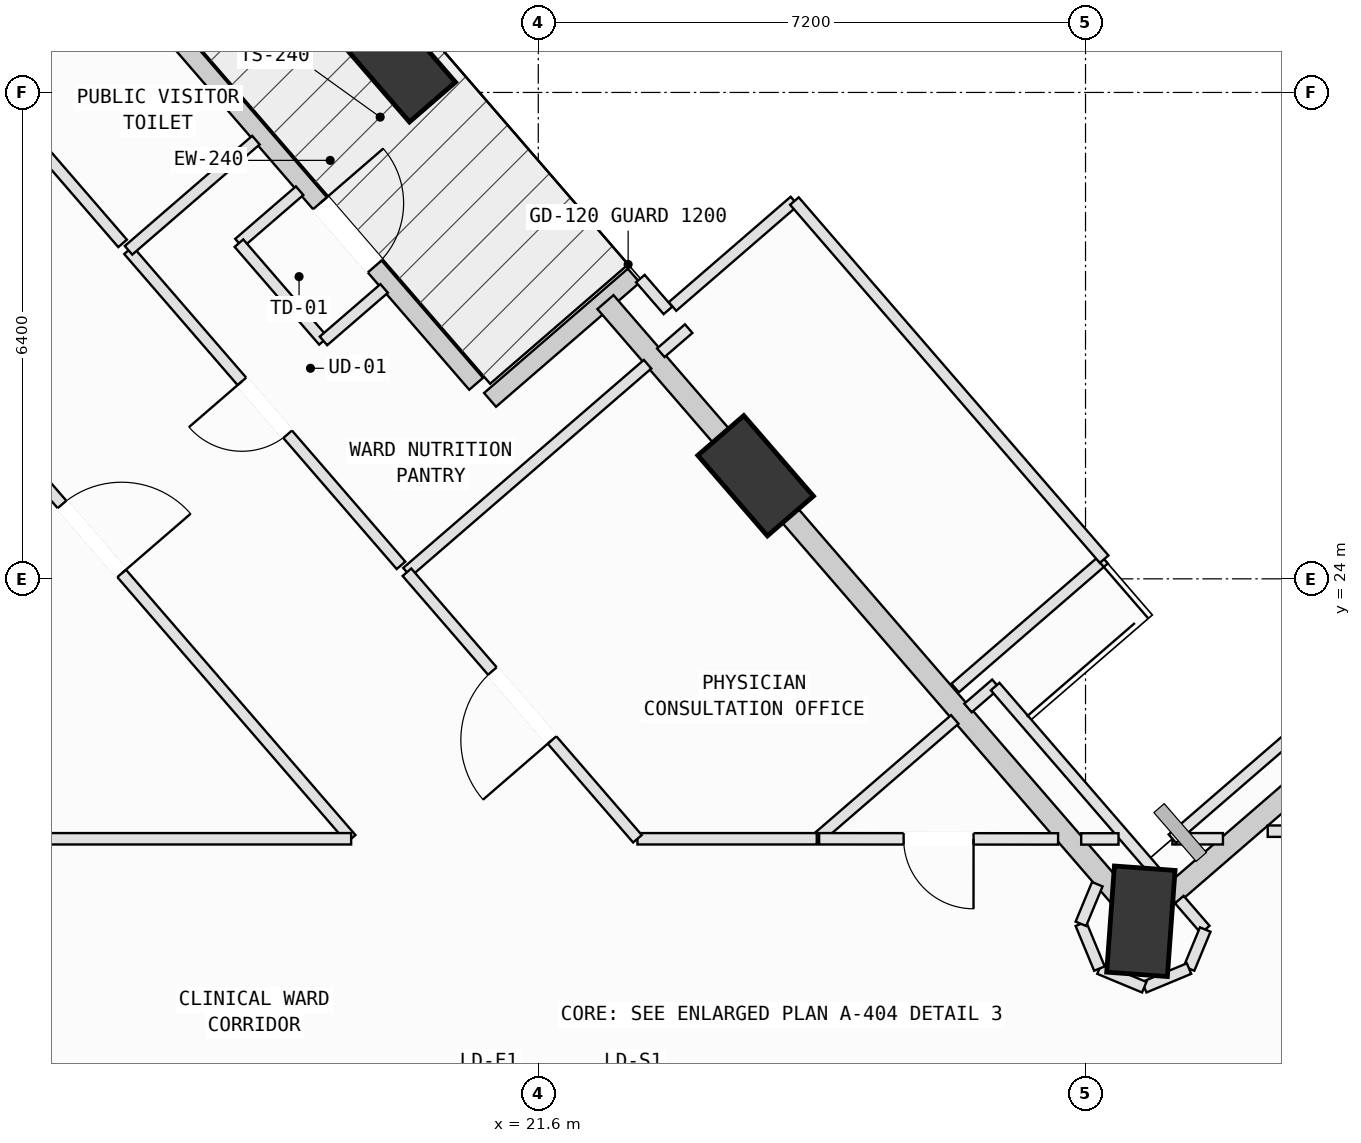
"""IFC4 building model, lengths in metres.
Left out: names, types, materials, properties, quantities, classifications, styles, units other than length and angle.
Written with IfcOpenShell. Run it as: python <this file> out.ifc"""

import sys

from ifc_helpers import new_model, si_unit, direction, frame, frame_2d, origin, origin_2d, place, context, subcontext, project, spatial, rectangle, extrude, element, fill, save


model = new_model("IFC4")
c1 = context("Model", 3, precision=1e-05, world=origin(), true_north=direction((0.0, 1.0)))
c2 = subcontext(c1, "Body", "Model", "MODEL_VIEW")
j1 = project(units=[si_unit("LENGTHUNIT", "METRE"), si_unit("PLANEANGLEUNIT", "RADIAN")], contexts=[c1])
p1 = place(None, origin())
s1 = spatial("IfcSite", under=j1, at=p1, CompositionType="ELEMENT")
p2 = place(p1, origin())
s2 = spatial("IfcBuilding", under=s1, at=p2, CompositionType="ELEMENT")
p3 = place(p2, frame((0.0, 0.0, 197.8)))
s3 = spatial("IfcBuildingStorey", under=s2, at=p3, CompositionType="ELEMENT", Elevation=197.8)
p4 = place(p3, frame((29.529, 19.495, 0.002), z_axis=(0.022106472195, -0.016732523153, 0.999615589392), x_axis=(-0.751277418033, 0.659407001277, 0.027652266093)))
e1 = element("IfcColumn", 1, at=p4, inside=s3, PredefinedType="COLUMN", context=c2, shape_type="SweptSolid", body=[
    extrude(rectangle(XDim=1.4, YDim=0.8, at=origin_2d()), origin(), (0.0, 0.0, 1.0), 3.998),
])
p5 = place(p3, frame((24.459, 25.357, 0.002), z_axis=(-0.001953505753, -0.03791022102, 0.999279239731), x_axis=(-0.614315591928, 0.788537788742, 0.028714268915)))
e2 = element("IfcColumn", 2, at=p5, inside=s3, PredefinedType="COLUMN", context=c2, shape_type="SweptSolid", body=[
    extrude(rectangle(XDim=1.4, YDim=0.8, at=origin_2d()), origin(), (0.0, 0.0, 1.0), 3.999),
])
p6 = place(p3, frame((19.75, 30.803, 0.002), z_axis=(-0.024327793483, -0.057496514422, 0.998049251938), x_axis=(-0.30819596819, 0.95015002601, 0.047224710319)))
e3 = element("IfcColumn", 3, at=p6, inside=s3, PredefinedType="COLUMN", context=c2, shape_type="SweptSolid", body=[
    extrude(rectangle(XDim=1.4, YDim=0.8, at=origin_2d()), origin(), (0.0, 0.0, 1.0), 4.004),
])
p7 = place(p3, frame((16.23, 31.831, 0.0), z_axis=(0.0, 0.0, 1.0), x_axis=(0.654092813451, -0.756414298775, 0.0)))
e4 = element("IfcWall", 4, at=p7, inside=s3, PredefinedType="SOLIDWALL", context=c2, shape_type="SweptSolid", body=[
    extrude(rectangle(XDim=6.96, YDim=0.24, at=frame_2d((3.48, 0.0))), origin(), (0.0, 0.0, 1.0), 3.265),
])
p8 = place(p7, frame((3.82, 0.0, 0.0)))
e5 = element("IfcOpeningElement", 5, at=p8, cuts=e4, PredefinedType="OPENING", context=c2, shape_type="SweptSolid", body=[
    extrude(rectangle(XDim=1.1, YDim=2.15, at=frame_2d((0.55, 1.075))), frame((0.0, 0.13, 0.0), z_axis=(0.0, -1.0, 0.0), x_axis=(1.0, 0.0, 0.0)), (0.0, 0.0, 1.0), 0.26),
])
p9 = place(p3, frame((20.966, 26.355, 0.0), z_axis=(0.0, 0.0, 1.0), x_axis=(0.756423238551, 0.65408247506, 0.0)))
e6 = element("IfcWall", 6, at=p9, inside=s3, PredefinedType="SOLIDWALL", context=c2, shape_type="SweptSolid", body=[
    extrude(rectangle(XDim=2.5, YDim=0.24, at=frame_2d((1.25, 0.0))), origin(), (0.0, 0.0, 1.0), 3.265),
])
p10 = place(p3, frame((29.91, 19.825, 0.0), z_axis=(0.0, 0.0, 1.0), x_axis=(0.756415755537, 0.6540911288, 0.0)))
e7 = element("IfcWall", 7, at=p10, inside=s3, PredefinedType="SOLIDWALL", context=c2, shape_type="SweptSolid", body=[
    extrude(rectangle(XDim=5.96, YDim=0.28, at=frame_2d((2.98, 0.0))), origin(), (0.0, 0.0, 1.0), 3.065),
])
p11 = place(p3, frame((29.24, 19.829, 0.0), z_axis=(0.0, 0.0, 1.0), x_axis=(-0.654095531107, 0.756411948733, 0.0)))
e8 = element("IfcWall", 8, at=p11, inside=s3, PredefinedType="SOLIDWALL", context=c2, shape_type="SweptSolid", body=[
    extrude(rectangle(XDim=6.76, YDim=0.28, at=frame_2d((3.38, 0.0))), origin(), (0.0, 0.0, 1.0), 3.265),
])
p12 = place(p3, frame((24.172, 25.689, 0.0), z_axis=(0.0, 0.0, 1.0), x_axis=(-0.654087588851, 0.756418816603, 0.0)))
e9 = element("IfcWall", 9, at=p12, inside=s3, PredefinedType="SOLIDWALL", context=c2, shape_type="SweptSolid", body=[
    extrude(rectangle(XDim=2.582, YDim=0.28, at=frame_2d((1.291, 0.0))), origin(), (0.0, 0.0, 1.0), 3.245),
])
p13 = place(p3, frame((12.314, 28.471, 0.0), z_axis=(0.0, 0.0, 1.0), x_axis=(0.654121175756, -0.756389772159, 0.0)))
e10 = element("IfcWall", 10, at=p13, inside=s3, PredefinedType="PARTITIONING", context=c2, shape_type="SweptSolid", body=[
    extrude(rectangle(XDim=10.432, YDim=0.15, at=frame_2d((5.216, 0.0))), origin(), (0.0, 0.0, 1.0), 3.78),
])
p14 = place(p13, frame((4.616, 0.0, 0.0)))
e11 = element("IfcOpeningElement", 11, at=p14, cuts=e10, PredefinedType="OPENING", context=c2, shape_type="SweptSolid", body=[
    extrude(rectangle(XDim=1.2, YDim=2.15, at=frame_2d((0.6, 1.075))), frame((0.0, 0.085, 0.0), z_axis=(0.0, -1.0, 0.0), x_axis=(1.0, 0.0, 0.0)), (0.0, 0.0, 1.0), 0.17),
])
p15 = place(p3, frame((19.138, 20.58, 0.0), z_axis=(0.0, 0.0, 1.0), x_axis=(-1.0, 0.0, 0.0)))
e12 = element("IfcWall", 12, at=p15, inside=s3, PredefinedType="PARTITIONING", context=c2, shape_type="SweptSolid", body=[
    extrude(rectangle(XDim=4.141, YDim=0.15, at=frame_2d((2.07, 0.0))), origin(), (0.0, 0.0, 1.0), 3.78),
])
p16 = place(p3, frame((30.608, 20.58, 0.0), z_axis=(0.0, 0.0, 1.0), x_axis=(-1.0, 0.0, 0.0)))
e13 = element("IfcWall", 13, at=p16, inside=s3, PredefinedType="PARTITIONING", context=c2, shape_type="SweptSolid", body=[
    extrude(rectangle(XDim=0.665, YDim=0.15, at=frame_2d((0.333, 0.0))), origin(), (0.0, 0.0, 1.0), 3.78),
])
p17 = place(p3, frame((29.943, 20.58, 0.0), z_axis=(0.0, 0.0, 1.0), x_axis=(0.756413617827, 0.654093600921, 0.0)))
e14 = element("IfcWall", 14, at=p17, inside=s3, PredefinedType="PARTITIONING", context=c2, shape_type="SweptSolid", body=[
    extrude(rectangle(XDim=12.167, YDim=0.15, at=frame_2d((6.083, 0.0))), origin(), (0.0, 0.0, 1.0), 3.78),
])
p18 = place(p3, frame((40.134, 20.68, 0.0), z_axis=(0.0, 0.0, 1.0), x_axis=(-1.0, 0.0, 0.0)))
e15 = element("IfcWall", 15, at=p18, inside=s3, PredefinedType="PARTITIONING", context=c2, shape_type="SweptSolid", body=[
    extrude(rectangle(XDim=8.937, YDim=0.15, at=frame_2d((4.469, 0.0))), origin(), (0.0, 0.0, 1.0), 3.78),
])
p19 = place(p18, frame((3.868, 0.0, 0.0)))
e16 = element("IfcOpeningElement", 16, at=p19, cuts=e15, PredefinedType="OPENING", context=c2, shape_type="SweptSolid", body=[
    extrude(rectangle(XDim=1.2, YDim=2.15, at=frame_2d((0.6, 1.075))), frame((0.0, 0.085, 0.0), z_axis=(0.0, -1.0, 0.0), x_axis=(1.0, 0.0, 0.0)), (0.0, 0.0, 1.0), 0.17),
])
p20 = place(p3, frame((19.872, 24.087, 0.0), z_axis=(0.0, 0.0, 1.0), x_axis=(0.756494990974, 0.653999486721, 0.0)))
e17 = element("IfcWall", 17, at=p20, inside=s3, PredefinedType="PARTITIONING", context=c2, shape_type="SweptSolid", body=[
    extrude(rectangle(XDim=4.185, YDim=0.15, at=frame_2d((2.093, 0.0))), origin(), (0.0, 0.0, 1.0), 3.78),
])
for number, where, z_axis, x_axis in (
    (18, (23.212, 26.975, 0.0), (0.0, 0.0, 1.0), (0.757, 0.653, 0.0)),
    (19, (27.621, 22.618, 0.0), (0.0, 0.0, 1.0), (-0.757, -0.653, 0.0)),
):
    element("IfcWall", number, at=place(p3, frame(where, z_axis=z_axis, x_axis=x_axis)), inside=s3, PredefinedType="PARTITIONING", context=c2, shape_type="SweptSolid", body=[
        extrude(rectangle(XDim=0.485, YDim=0.15, at=frame_2d((0.243, 0.0))), origin(), (0.0, 0.0, 1.0), 3.78),
    ])
p21 = place(p3, frame((27.08, 22.15, 0.0), z_axis=(0.0, 0.0, 1.0), x_axis=(-0.756550817831, -0.653934905048, 0.0)))
e20 = element("IfcWall", 20, at=p21, inside=s3, PredefinedType="PARTITIONING", context=c2, shape_type="SweptSolid", body=[
    extrude(rectangle(XDim=2.401, YDim=0.15, at=frame_2d((1.2, 0.0))), origin(), (0.0, 0.0, 1.0), 3.78),
])
p22 = place(p3, frame((25.264, 20.58, 0.0), z_axis=(0.0, 0.0, 1.0), x_axis=(-1.0, 0.0, 0.0)))
e21 = element("IfcWall", 21, at=p22, inside=s3, PredefinedType="PARTITIONING", context=c2, shape_type="SweptSolid", body=[
    extrude(rectangle(XDim=2.359, YDim=0.15, at=frame_2d((1.179, 0.0))), origin(), (0.0, 0.0, 1.0), 3.78),
])
p23 = place(p3, frame((22.905, 20.58, 0.0), z_axis=(0.0, 0.0, 1.0), x_axis=(-0.654154375425, 0.756361060018, 0.0)))
e22 = element("IfcWall", 22, at=p23, inside=s3, PredefinedType="PARTITIONING", context=c2, shape_type="SweptSolid", body=[
    extrude(rectangle(XDim=4.636, YDim=0.15, at=frame_2d((2.318, 0.0))), origin(), (0.0, 0.0, 1.0), 3.78),
])
p24 = place(p23, frame((1.718, 0.0, 0.0)))
e23 = element("IfcOpeningElement", 23, at=p24, cuts=e22, PredefinedType="OPENING", context=c2, shape_type="SweptSolid", body=[
    extrude(rectangle(XDim=1.2, YDim=2.15, at=frame_2d((0.6, 1.075))), frame((0.0, 0.085, 0.0), z_axis=(0.0, -1.0, 0.0), x_axis=(1.0, 0.0, 0.0)), (0.0, 0.0, 1.0), 0.17),
])
p25 = place(p3, frame((19.794, 24.178, 0.0), z_axis=(0.0, 0.0, 1.0), x_axis=(-0.6541601986, 0.756356023687, 0.0)))
e24 = element("IfcWall", 24, at=p25, inside=s3, PredefinedType="PARTITIONING", context=c2, shape_type="SweptSolid", body=[
    extrude(rectangle(XDim=5.48, YDim=0.15, at=frame_2d((2.74, 0.0))), origin(), (0.0, 0.0, 1.0), 3.78),
])
p26 = place(p25, frame((2.28, 0.0, 0.0)))
e25 = element("IfcOpeningElement", 25, at=p26, cuts=e24, PredefinedType="OPENING", context=c2, shape_type="SweptSolid", body=[
    extrude(rectangle(XDim=0.92, YDim=2.1, at=frame_2d((0.46, 1.05))), frame((0.0, 0.085, 0.0), z_axis=(0.0, -1.0, 0.0), x_axis=(1.0, 0.0, 0.0)), (0.0, 0.0, 1.0), 0.17),
])
p27 = place(p3, frame((16.209, 28.323, 0.0), z_axis=(0.0, 0.0, 1.0), x_axis=(0.756488411531, 0.654007097223, 0.0)))
e26 = element("IfcWall", 26, at=p27, inside=s3, PredefinedType="PARTITIONING", context=c2, shape_type="SweptSolid", body=[
    extrude(rectangle(XDim=2.216, YDim=0.15, at=frame_2d((1.108, 0.0))), origin(), (0.0, 0.0, 1.0), 3.78),
])
p28 = place(p3, frame((18.46, 29.107, 0.0), z_axis=(0.0, 0.0, 1.0), x_axis=(-0.756406502771, -0.654101828896, 0.0)))
e27 = element("IfcWall", 27, at=p28, inside=s3, PredefinedType="PARTITIONING", context=c2, shape_type="SweptSolid", body=[
    extrude(rectangle(XDim=1.055, YDim=0.15, at=frame_2d((0.527, 0.0))), origin(), (0.0, 0.0, 1.0), 3.78),
])
p29 = place(p3, frame((17.662, 28.417, 0.0), z_axis=(0.0, 0.0, 1.0), x_axis=(0.654049777845, -0.75645151074, 0.0)))
e28 = element("IfcWall", 28, at=p29, inside=s3, PredefinedType="PARTITIONING", context=c2, shape_type="SweptSolid", body=[
    extrude(rectangle(XDim=1.7, YDim=0.15, at=frame_2d((0.85, 0.0))), origin(), (0.0, 0.0, 1.0), 3.78),
])
p30 = place(p3, frame((18.774, 27.131, 0.0), z_axis=(0.0, 0.0, 1.0), x_axis=(0.756505506121, 0.653987323431, 0.0)))
e29 = element("IfcWall", 29, at=p30, inside=s3, PredefinedType="PARTITIONING", context=c2, shape_type="SweptSolid", body=[
    extrude(rectangle(XDim=1.055, YDim=0.15, at=frame_2d((0.527, 0.0))), origin(), (0.0, 0.0, 1.0), 3.78),
])
p31 = place(p3, frame((22.943, 27.951, 0.0), z_axis=(0.0, 0.0, 1.0), x_axis=(0.654628599647, -0.755950657466, 0.0)))
e30 = element("IfcWall", 30, at=p31, inside=s3, PredefinedType="PARTITIONING", context=c2, shape_type="SweptSolid", body=[
    extrude(rectangle(XDim=0.554, YDim=0.15, at=frame_2d((0.277, 0.0))), origin(), (0.0, 0.0, 1.0), 3.78),
])
p32 = place(p3, frame((16.131, 28.414, 0.0), z_axis=(0.0, 0.0, 1.0), x_axis=(-0.654044709292, 0.756455893127, 0.0)))
e31 = element("IfcWall", 31, at=p32, inside=s3, PredefinedType="PARTITIONING", context=c2, shape_type="SweptSolid", body=[
    extrude(rectangle(XDim=5.176, YDim=0.15, at=frame_2d((2.588, 0.0))), origin(), (0.0, 0.0, 1.0), 3.78),
])
p33 = place(p32, frame((2.128, 0.0, 0.0)))
e32 = element("IfcOpeningElement", 32, at=p33, cuts=e31, PredefinedType="OPENING", context=c2, shape_type="SweptSolid", body=[
    extrude(rectangle(XDim=0.92, YDim=2.1, at=frame_2d((0.46, 1.05))), frame((0.0, 0.085, 0.0), z_axis=(0.0, -1.0, 0.0), x_axis=(1.0, 0.0, 0.0)), (0.0, 0.0, 1.0), 0.17),
])
p34 = place(p3, frame((27.611, 22.583, 0.0), z_axis=(0.0, 0.0, 1.0), x_axis=(0.654036787696, -0.756462742203, 0.0)))
e33 = element("IfcWall", 33, at=p34, inside=s3, PredefinedType="PARTITIONING", context=c2, shape_type="SweptSolid", body=[
    extrude(rectangle(XDim=3.475, YDim=0.15, at=frame_2d((1.738, 0.0))), origin(), (0.0, 0.0, 1.0), 3.78),
])
p35 = place(p3, frame((30.034, 19.78, 0.0), z_axis=(0.0, 0.0, 1.0), x_axis=(0.654448859081, -0.756106269547, 0.0)))
e34 = element("IfcWall", 34, at=p35, inside=s3, PredefinedType="PARTITIONING", context=c2, shape_type="SweptSolid", body=[
    extrude(rectangle(XDim=0.521, YDim=0.15, at=frame_2d((0.261, 0.0))), origin(), (0.0, 0.0, 1.0), 3.78),
])
p36 = place(p3, frame((30.375, 19.386, 0.0), z_axis=(0.0, 0.0, 1.0), x_axis=(-0.382713570591, -0.923867048273, 0.0)))
e35 = element("IfcWall", 35, at=p36, inside=s3, PredefinedType="PARTITIONING", context=c2, shape_type="SweptSolid", body=[
    extrude(rectangle(XDim=0.556, YDim=0.15, at=frame_2d((0.278, 0.0))), origin(), (0.0, 0.0, 1.0), 3.78),
])
p37 = place(p3, frame((30.162, 18.872, 0.0), z_axis=(0.0, 0.0, 1.0), x_axis=(-0.92326925104, -0.384153472045, 0.0)))
e36 = element("IfcWall", 36, at=p37, inside=s3, PredefinedType="PARTITIONING", context=c2, shape_type="SweptSolid", body=[
    extrude(rectangle(XDim=0.638, YDim=0.15, at=frame_2d((0.319, 0.0))), origin(), (0.0, 0.0, 1.0), 3.78),
])
p38 = place(p3, frame((29.573, 18.627, 0.0), z_axis=(0.0, 0.0, 1.0), x_axis=(-0.923494633817, 0.383611341478, 0.0)))
e37 = element("IfcWall", 37, at=p38, inside=s3, PredefinedType="PARTITIONING", context=c2, shape_type="SweptSolid", body=[
    extrude(rectangle(XDim=0.639, YDim=0.15, at=frame_2d((0.319, 0.0))), origin(), (0.0, 0.0, 1.0), 3.78),
])
p39 = place(p3, frame((28.983, 18.872, 0.0), z_axis=(0.0, 0.0, 1.0), x_axis=(-0.382656259044, 0.923890787601, 0.0)))
e38 = element("IfcWall", 38, at=p39, inside=s3, PredefinedType="PARTITIONING", context=c2, shape_type="SweptSolid", body=[
    extrude(rectangle(XDim=0.637, YDim=0.15, at=frame_2d((0.319, 0.0))), origin(), (0.0, 0.0, 1.0), 3.78),
])
p40 = place(p3, frame((28.739, 19.461, 0.0), z_axis=(0.0, 0.0, 1.0), x_axis=(0.383078082641, 0.923715964244, 0.0)))
e39 = element("IfcWall", 39, at=p40, inside=s3, PredefinedType="PARTITIONING", context=c2, shape_type="SweptSolid", body=[
    extrude(rectangle(XDim=0.564, YDim=0.15, at=frame_2d((0.282, 0.0))), origin(), (0.0, 0.0, 1.0), 3.78),
])
p41 = place(p3, frame((29.234, 20.578, 0.0), z_axis=(0.0, 0.0, 1.0), x_axis=(-1.0, 0.0, 0.0)))
e40 = element("IfcWall", 40, at=p41, inside=s3, PredefinedType="PARTITIONING", context=c2, shape_type="SweptSolid", body=[
    extrude(rectangle(XDim=0.491, YDim=0.15, at=frame_2d((0.246, 0.0))), origin(), (0.0, 0.0, 1.0), 3.78),
])
p42 = place(p3, frame((28.439, 20.578, 0.0), z_axis=(0.0, 0.0, 1.0), x_axis=(-0.999999755793, 0.000698866113, 0.0)))
e41 = element("IfcWall", 41, at=p42, inside=s3, PredefinedType="PARTITIONING", context=c2, shape_type="SweptSolid", body=[
    extrude(rectangle(XDim=3.144, YDim=0.15, at=frame_2d((1.572, 0.0))), origin(), (0.0, 0.0, 1.0), 3.78),
])
p43 = place(p42, frame((1.112, 0.0, 0.0)))
e42 = element("IfcOpeningElement", 42, at=p43, cuts=e41, PredefinedType="OPENING", context=c2, shape_type="SweptSolid", body=[
    extrude(rectangle(XDim=0.92, YDim=2.1, at=frame_2d((0.46, 1.05))), frame((0.0, 0.085, 0.0), z_axis=(0.0, -1.0, 0.0), x_axis=(1.0, 0.0, 0.0)), (0.0, 0.0, 1.0), 0.17),
])
p44 = place(p3, frame((29.045, 24.259, 0.0), z_axis=(0.0, 0.0, 1.0), x_axis=(-0.756369471886, -0.654144649141, 0.0)))
e43 = element("IfcWall", 43, at=p44, inside=s3, PredefinedType="PARTITIONING", context=c2, shape_type="SweptSolid", body=[
    extrude(rectangle(XDim=2.591, YDim=0.15, at=frame_2d((1.296, 0.0))), origin(), (0.0, 0.0, 1.0), 3.78),
])
p45 = place(p3, frame((23.366, 27.584, 0.0), z_axis=(0.0, 0.0, 1.0), x_axis=(0.756429371743, 0.654075382173, 0.0)))
e44 = element("IfcWall", 44, at=p45, inside=s3, PredefinedType="PARTITIONING", context=c2, shape_type="SweptSolid", body=[
    extrude(rectangle(XDim=2.121, YDim=0.15, at=frame_2d((1.06, 0.0))), origin(), (0.0, 0.0, 1.0), 3.78),
])
p46 = place(p3, frame((24.97, 28.971, 0.0), z_axis=(0.0, 0.0, 1.0), x_axis=(0.654131936112, -0.756380466537, 0.0)))
e45 = element("IfcWall", 45, at=p46, inside=s3, PredefinedType="PARTITIONING", context=c2, shape_type="SweptSolid", body=[
    extrude(rectangle(XDim=6.229, YDim=0.15, at=frame_2d((3.115, 0.0))), origin(), (0.0, 0.0, 1.0), 3.78),
])
p47 = place(p8, origin())
e46 = element("IfcDoor", 46, at=p47, inside=s3, OperationType="SINGLE_SWING_LEFT", PredefinedType="DOOR", context=c2, shape_type="SweptSolid", body=[
    extrude(rectangle(XDim=1.1, YDim=2.15, at=frame_2d((0.55, 1.075))), frame((0.0, 0.025, 0.0), z_axis=(0.0, -1.0, 0.0), x_axis=(1.0, 0.0, 0.0)), (0.0, 0.0, 1.0), 0.05),
])
fill(e5, e46)
p48 = place(p14, origin())
e47 = element("IfcDoor", 47, at=p48, inside=s3, OperationType="SINGLE_SWING_RIGHT", PredefinedType="DOOR", context=c2, shape_type="SweptSolid", body=[
    extrude(rectangle(XDim=1.2, YDim=2.15, at=frame_2d((0.6, 1.075))), frame((0.0, 0.025, 0.0), z_axis=(0.0, -1.0, 0.0), x_axis=(1.0, 0.0, 0.0)), (0.0, 0.0, 1.0), 0.05),
])
fill(e11, e47)
p49 = place(p24, origin())
e48 = element("IfcDoor", 48, at=p49, inside=s3, OperationType="SINGLE_SWING_LEFT", PredefinedType="DOOR", context=c2, shape_type="SweptSolid", body=[
    extrude(rectangle(XDim=1.2, YDim=2.15, at=frame_2d((0.6, 1.075))), frame((0.0, 0.025, 0.0), z_axis=(0.0, -1.0, 0.0), x_axis=(1.0, 0.0, 0.0)), (0.0, 0.0, 1.0), 0.05),
])
fill(e23, e48)
p50 = place(p26, origin())
e49 = element("IfcDoor", 49, at=p50, inside=s3, OperationType="SINGLE_SWING_RIGHT", PredefinedType="DOOR", context=c2, shape_type="SweptSolid", body=[
    extrude(rectangle(XDim=0.92, YDim=2.1, at=frame_2d((0.46, 1.05))), frame((0.0, 0.025, 0.0), z_axis=(0.0, -1.0, 0.0), x_axis=(1.0, 0.0, 0.0)), (0.0, 0.0, 1.0), 0.05),
])
fill(e25, e49)
p51 = place(p43, origin())
e50 = element("IfcDoor", 50, at=p51, inside=s3, OperationType="SINGLE_SWING_LEFT", PredefinedType="DOOR", context=c2, shape_type="SweptSolid", body=[
    extrude(rectangle(XDim=0.92, YDim=2.1, at=frame_2d((0.46, 1.05))), frame((0.0, 0.025, 0.0), z_axis=(0.0, -1.0, 0.0), x_axis=(1.0, 0.0, 0.0)), (0.0, 0.0, 1.0), 0.05),
])
fill(e42, e50)
save(model, sys.argv[1])
